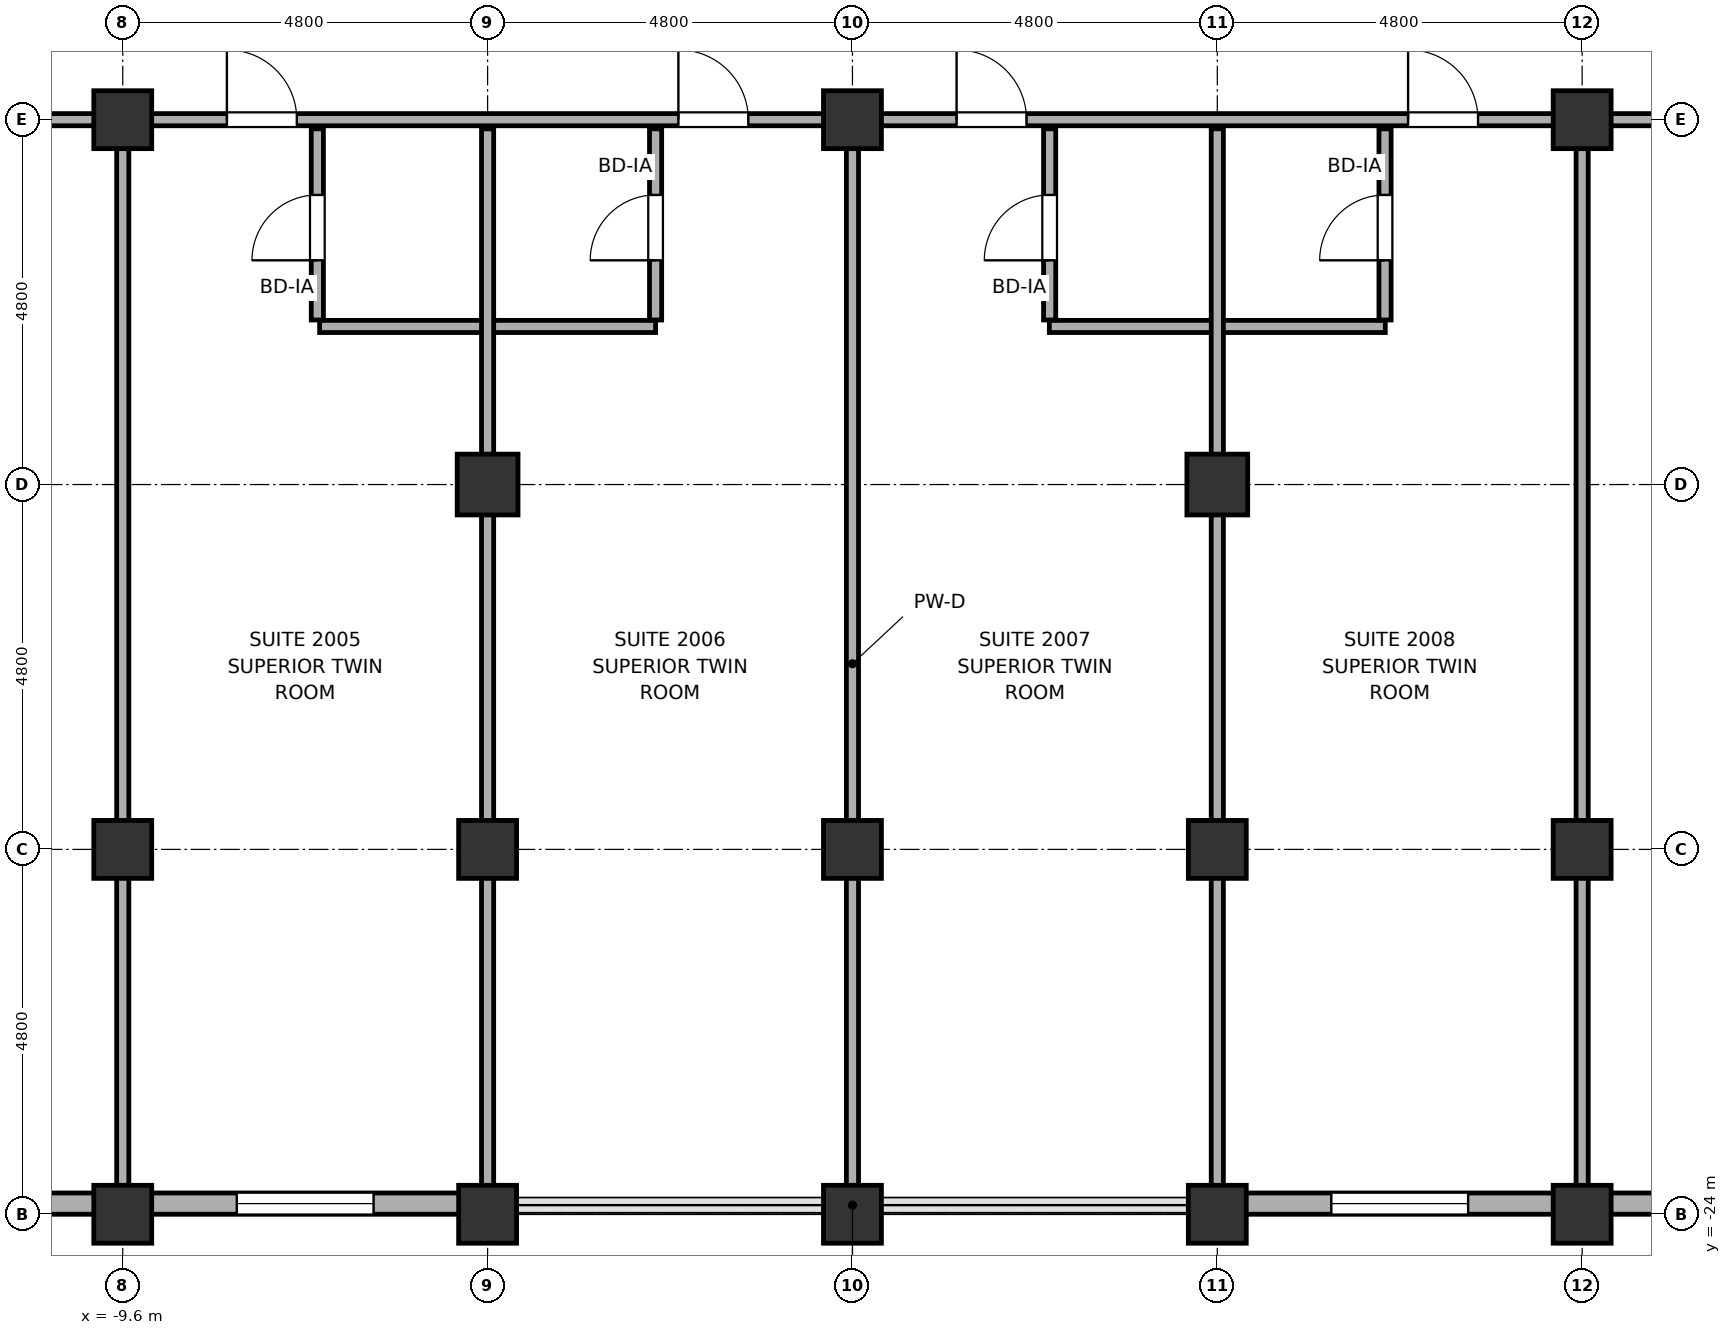
"""IFC4 building model, lengths in metres.
Left out: names, types, materials, properties, quantities, classifications, styles, units other than length and angle.
Written with IfcOpenShell. Run it as: python <this file> out.ifc"""

import sys

from ifc_helpers import new_model, si_unit, direction, frame, frame_2d, origin, origin_2d, place, context, subcontext, project, spatial, rectangle, hollow_rectangle, hollow_circle, extrude, element, fill, save


model = new_model("IFC4")
c1 = context("Model", 3, precision=1e-05, world=origin(), true_north=direction((0.0, 1.0)))
c2 = subcontext(c1, "Body", "Model", "MODEL_VIEW")
j1 = project(units=[si_unit("LENGTHUNIT", "METRE"), si_unit("PLANEANGLEUNIT", "RADIAN")], contexts=[c1])
p1 = place(None, origin())
s1 = spatial("IfcSite", under=j1, at=p1, CompositionType="ELEMENT")
p2 = place(p1, origin())
s2 = spatial("IfcBuilding", under=s1, at=p2, CompositionType="ELEMENT")
p3 = place(p2, frame((0.0, 0.0, 85.5)))
s3 = spatial("IfcBuildingStorey", under=s2, at=p3, CompositionType="ELEMENT", Elevation=85.5)
for number, where, z_axis, x_axis in (
    (1, (-9.6, -24.0, 0.0), (0.0, 0.0, 1.0), (1.0, 0.0, 0.0)),
    (2, (-9.6, -19.2, 0.0), (0.0, 0.0, 1.0), (1.0, 0.0, 0.0)),
    (3, (-9.6, -9.6, 0.0), (0.0, 0.0, 1.0), (1.0, 0.0, 0.0)),
    (4, (-4.8, -24.0, 0.0), (0.0, 0.0, 1.0), (1.0, 0.0, 0.0)),
    (5, (-4.8, -19.2, 0.0), (0.0, 0.0, 1.0), (1.0, 0.0, 0.0)),
):
    element("IfcColumn", number, at=place(p3, frame(where, z_axis=z_axis, x_axis=x_axis)), inside=s3, PredefinedType="COLUMN", context=c2, shape_type="SweptSolid", body=[
        extrude(hollow_circle(Radius=0.381, WallThickness=0.032, at=origin_2d()), origin(), (0.0, 0.0, 1.0), 3.7),
    ])
p4 = place(p3, frame((-4.8, -14.4, 0.0), z_axis=(0.0, 0.0, 1.0), x_axis=(1.0, 0.0, 0.0)))
e6 = element("IfcColumn", 6, at=p4, inside=s3, PredefinedType="COLUMN", context=c2, shape_type="SweptSolid", body=[
    extrude(hollow_rectangle(XDim=0.8, YDim=0.8, WallThickness=0.036, at=origin_2d()), origin(), (0.0, 0.0, 1.0), 3.7),
])
for number, where, z_axis, x_axis in (
    (7, (0.0, -24.0, 0.0), (0.0, 0.0, 1.0), (1.0, 0.0, 0.0)),
    (8, (0.0, -19.2, 0.0), (0.0, 0.0, 1.0), (1.0, 0.0, 0.0)),
    (9, (0.0, -9.6, 0.0), (0.0, 0.0, 1.0), (1.0, 0.0, 0.0)),
    (10, (4.8, -24.0, 0.0), (0.0, 0.0, 1.0), (1.0, 0.0, 0.0)),
    (11, (4.8, -19.2, 0.0), (0.0, 0.0, 1.0), (1.0, 0.0, 0.0)),
):
    element("IfcColumn", number, at=place(p3, frame(where, z_axis=z_axis, x_axis=x_axis)), inside=s3, PredefinedType="COLUMN", context=c2, shape_type="SweptSolid", body=[
        extrude(hollow_circle(Radius=0.381, WallThickness=0.032, at=origin_2d()), origin(), (0.0, 0.0, 1.0), 3.7),
    ])
p5 = place(p3, frame((4.8, -14.4, 0.0), z_axis=(0.0, 0.0, 1.0), x_axis=(1.0, 0.0, 0.0)))
e12 = element("IfcColumn", 12, at=p5, inside=s3, PredefinedType="COLUMN", context=c2, shape_type="SweptSolid", body=[
    extrude(hollow_rectangle(XDim=0.8, YDim=0.8, WallThickness=0.036, at=origin_2d()), origin(), (0.0, 0.0, 1.0), 3.7),
])
for number, where, z_axis, x_axis in (
    (13, (9.6, -24.0, 0.0), (0.0, 0.0, 1.0), (1.0, 0.0, 0.0)),
    (14, (9.6, -19.2, 0.0), (0.0, 0.0, 1.0), (1.0, 0.0, 0.0)),
    (15, (9.6, -9.6, 0.0), (0.0, 0.0, 1.0), (1.0, 0.0, 0.0)),
):
    element("IfcColumn", number, at=place(p3, frame(where, z_axis=z_axis, x_axis=x_axis)), inside=s3, PredefinedType="COLUMN", context=c2, shape_type="SweptSolid", body=[
        extrude(hollow_circle(Radius=0.381, WallThickness=0.032, at=origin_2d()), origin(), (0.0, 0.0, 1.0), 3.7),
    ])
p6 = place(p3, frame((-25.2, -23.86, 0.0), z_axis=(0.0, 0.0, 1.0), x_axis=(1.0, 0.0, 0.0)))
e16 = element("IfcWall", 16, at=p6, inside=s3, PredefinedType="SOLIDWALL", context=c2, shape_type="SweptSolid", body=[
    extrude(rectangle(XDim=20.45, YDim=0.28, at=frame_2d((10.225, 0.0))), origin(), (0.0, 0.0, 1.0), 2.05),
])
p7 = place(p6, frame((7.5, 0.0, 0.75)))
e17 = element("IfcOpeningElement", 17, at=p7, cuts=e16, PredefinedType="OPENING", context=c2, shape_type="SweptSolid", body=[
    extrude(rectangle(XDim=1.8, YDim=1.15, at=frame_2d((0.9, 0.575))), frame((0.0, 0.155, 0.0), z_axis=(0.0, -1.0, 0.0), x_axis=(1.0, 0.0, 0.0)), (0.0, 0.0, 1.0), 0.31),
])
p8 = place(p6, frame((12.3, 0.0, 0.75)))
e18 = element("IfcOpeningElement", 18, at=p8, cuts=e16, PredefinedType="OPENING", context=c2, shape_type="SweptSolid", body=[
    extrude(rectangle(XDim=1.8, YDim=1.15, at=frame_2d((0.9, 0.575))), frame((0.0, 0.155, 0.0), z_axis=(0.0, -1.0, 0.0), x_axis=(1.0, 0.0, 0.0)), (0.0, 0.0, 1.0), 0.31),
])
p9 = place(p6, frame((17.1, 0.0, 0.75)))
e19 = element("IfcOpeningElement", 19, at=p9, cuts=e16, PredefinedType="OPENING", context=c2, shape_type="SweptSolid", body=[
    extrude(rectangle(XDim=1.8, YDim=1.15, at=frame_2d((0.9, 0.575))), frame((0.0, 0.155, 0.0), z_axis=(0.0, -1.0, 0.0), x_axis=(1.0, 0.0, 0.0)), (0.0, 0.0, 1.0), 0.31),
])
p10 = place(p3, frame((4.75, -23.86, 0.0), z_axis=(0.0, 0.0, 1.0), x_axis=(1.0, 0.0, 0.0)))
e20 = element("IfcWall", 20, at=p10, inside=s3, PredefinedType="SOLIDWALL", context=c2, shape_type="SweptSolid", body=[
    extrude(rectangle(XDim=25.25, YDim=0.28, at=frame_2d((12.625, 0.0))), origin(), (0.0, 0.0, 1.0), 2.05),
])
p11 = place(p10, frame((1.55, 0.0, 0.75)))
e21 = element("IfcOpeningElement", 21, at=p11, cuts=e20, PredefinedType="OPENING", context=c2, shape_type="SweptSolid", body=[
    extrude(rectangle(XDim=1.8, YDim=1.15, at=frame_2d((0.9, 0.575))), frame((0.0, 0.155, 0.0), z_axis=(0.0, -1.0, 0.0), x_axis=(1.0, 0.0, 0.0)), (0.0, 0.0, 1.0), 0.31),
])
p12 = place(p10, frame((6.35, 0.0, 0.75)))
e22 = element("IfcOpeningElement", 22, at=p12, cuts=e20, PredefinedType="OPENING", context=c2, shape_type="SweptSolid", body=[
    extrude(rectangle(XDim=1.8, YDim=1.15, at=frame_2d((0.9, 0.575))), frame((0.0, 0.155, 0.0), z_axis=(0.0, -1.0, 0.0), x_axis=(1.0, 0.0, 0.0)), (0.0, 0.0, 1.0), 0.31),
])
p13 = place(p10, frame((11.15, 0.0, 0.75)))
e23 = element("IfcOpeningElement", 23, at=p13, cuts=e20, PredefinedType="OPENING", context=c2, shape_type="SweptSolid", body=[
    extrude(rectangle(XDim=1.8, YDim=1.15, at=frame_2d((0.9, 0.575))), frame((0.0, 0.155, 0.0), z_axis=(0.0, -1.0, 0.0), x_axis=(1.0, 0.0, 0.0)), (0.0, 0.0, 1.0), 0.31),
])
p14 = place(p10, frame((15.95, 0.0, 0.75)))
e24 = element("IfcOpeningElement", 24, at=p14, cuts=e20, PredefinedType="OPENING", context=c2, shape_type="SweptSolid", body=[
    extrude(rectangle(XDim=1.8, YDim=1.15, at=frame_2d((0.9, 0.575))), frame((0.0, 0.155, 0.0), z_axis=(0.0, -1.0, 0.0), x_axis=(1.0, 0.0, 0.0)), (0.0, 0.0, 1.0), 0.31),
])
for number, where, z_axis, x_axis in (
    (25, (-7.01, -12.32, 0.0), (0.0, 0.0, 1.0), (1.0, 0.0, 0.0)),
    (26, (2.59, -12.32, 0.0), (0.0, 0.0, 1.0), (1.0, 0.0, 0.0)),
):
    element("IfcWall", number, at=place(p3, frame(where, z_axis=z_axis, x_axis=x_axis)), inside=s3, PredefinedType="PARTITIONING", context=c2, shape_type="SweptSolid", body=[
        extrude(rectangle(XDim=4.42, YDim=0.16, at=frame_2d((2.21, 0.0))), origin(), (0.0, 0.0, 1.0), 2.75),
    ])
p15 = place(p3, frame((-28.51, -9.6, 0.0), z_axis=(0.0, 0.0, 1.0), x_axis=(1.0, 0.0, 0.0)))
e27 = element("IfcWall", 27, at=p15, inside=s3, PredefinedType="PARTITIONING", context=c2, shape_type="SweptSolid", body=[
    extrude(rectangle(XDim=61.82, YDim=0.16, at=frame_2d((30.91, 0.0))), origin(), (0.0, 0.0, 1.0), 2.05),
])
p16 = place(p15, frame((6.679, 0.0, 0.0)))
e28 = element("IfcOpeningElement", 28, at=p16, cuts=e27, PredefinedType="OPENING", context=c2, shape_type="SweptSolid", body=[
    extrude(rectangle(XDim=0.9, YDim=2.02, at=frame_2d((0.45, 1.01))), frame((0.0, 0.095, 0.0), z_axis=(0.0, -1.0, 0.0), x_axis=(1.0, 0.0, 0.0)), (0.0, 0.0, 1.0), 0.19),
])
p17 = place(p15, frame((54.5, 0.0, 0.0)))
e29 = element("IfcOpeningElement", 29, at=p17, cuts=e27, PredefinedType="OPENING", context=c2, shape_type="SweptSolid", body=[
    extrude(rectangle(XDim=0.9, YDim=2.02, at=frame_2d((0.45, 1.01))), frame((0.0, 0.095, 0.0), z_axis=(0.0, -1.0, 0.0), x_axis=(1.0, 0.0, 0.0)), (0.0, 0.0, 1.0), 0.19),
])
p18 = place(p15, frame((10.68, 0.0, 0.0)))
e30 = element("IfcOpeningElement", 30, at=p18, cuts=e27, PredefinedType="OPENING", context=c2, shape_type="SweptSolid", body=[
    extrude(rectangle(XDim=0.92, YDim=2.02, at=frame_2d((0.46, 1.01))), frame((0.0, 0.095, 0.0), z_axis=(0.0, -1.0, 0.0), x_axis=(1.0, 0.0, 0.0)), (0.0, 0.0, 1.0), 0.19),
])
p19 = place(p15, frame((16.62, 0.0, 0.0)))
e31 = element("IfcOpeningElement", 31, at=p19, cuts=e27, PredefinedType="OPENING", context=c2, shape_type="SweptSolid", body=[
    extrude(rectangle(XDim=0.92, YDim=2.02, at=frame_2d((0.46, 1.01))), frame((0.0, 0.095, 0.0), z_axis=(0.0, -1.0, 0.0), x_axis=(1.0, 0.0, 0.0)), (0.0, 0.0, 1.0), 0.19),
])
p20 = place(p15, frame((20.28, 0.0, 0.0)))
e32 = element("IfcOpeningElement", 32, at=p20, cuts=e27, PredefinedType="OPENING", context=c2, shape_type="SweptSolid", body=[
    extrude(rectangle(XDim=0.92, YDim=2.02, at=frame_2d((0.46, 1.01))), frame((0.0, 0.095, 0.0), z_axis=(0.0, -1.0, 0.0), x_axis=(1.0, 0.0, 0.0)), (0.0, 0.0, 1.0), 0.19),
])
p21 = place(p15, frame((26.22, 0.0, 0.0)))
e33 = element("IfcOpeningElement", 33, at=p21, cuts=e27, PredefinedType="OPENING", context=c2, shape_type="SweptSolid", body=[
    extrude(rectangle(XDim=0.92, YDim=2.02, at=frame_2d((0.46, 1.01))), frame((0.0, 0.095, 0.0), z_axis=(0.0, -1.0, 0.0), x_axis=(1.0, 0.0, 0.0)), (0.0, 0.0, 1.0), 0.19),
])
p22 = place(p15, frame((29.88, 0.0, 0.0)))
e34 = element("IfcOpeningElement", 34, at=p22, cuts=e27, PredefinedType="OPENING", context=c2, shape_type="SweptSolid", body=[
    extrude(rectangle(XDim=0.92, YDim=2.02, at=frame_2d((0.46, 1.01))), frame((0.0, 0.095, 0.0), z_axis=(0.0, -1.0, 0.0), x_axis=(1.0, 0.0, 0.0)), (0.0, 0.0, 1.0), 0.19),
])
p23 = place(p15, frame((35.82, 0.0, 0.0)))
e35 = element("IfcOpeningElement", 35, at=p23, cuts=e27, PredefinedType="OPENING", context=c2, shape_type="SweptSolid", body=[
    extrude(rectangle(XDim=0.92, YDim=2.02, at=frame_2d((0.46, 1.01))), frame((0.0, 0.095, 0.0), z_axis=(0.0, -1.0, 0.0), x_axis=(1.0, 0.0, 0.0)), (0.0, 0.0, 1.0), 0.19),
])
p24 = place(p15, frame((40.06, 0.0, 0.0)))
e36 = element("IfcOpeningElement", 36, at=p24, cuts=e27, PredefinedType="OPENING", context=c2, shape_type="SweptSolid", body=[
    extrude(rectangle(XDim=0.9, YDim=2.02, at=frame_2d((0.45, 1.01))), frame((0.0, 0.095, 0.0), z_axis=(0.0, -1.0, 0.0), x_axis=(1.0, 0.0, 0.0)), (0.0, 0.0, 1.0), 0.19),
])
p25 = place(p15, frame((44.86, 0.0, 0.0)))
e37 = element("IfcOpeningElement", 37, at=p25, cuts=e27, PredefinedType="OPENING", context=c2, shape_type="SweptSolid", body=[
    extrude(rectangle(XDim=0.9, YDim=2.02, at=frame_2d((0.45, 1.01))), frame((0.0, 0.095, 0.0), z_axis=(0.0, -1.0, 0.0), x_axis=(1.0, 0.0, 0.0)), (0.0, 0.0, 1.0), 0.19),
])
p26 = place(p15, frame((49.08, 0.0, 0.0)))
e38 = element("IfcOpeningElement", 38, at=p26, cuts=e27, PredefinedType="OPENING", context=c2, shape_type="SweptSolid", body=[
    extrude(rectangle(XDim=0.92, YDim=2.02, at=frame_2d((0.46, 1.01))), frame((0.0, 0.095, 0.0), z_axis=(0.0, -1.0, 0.0), x_axis=(1.0, 0.0, 0.0)), (0.0, 0.0, 1.0), 0.19),
])
p27 = place(p3, frame((-9.6, -23.71, 0.0), z_axis=(0.0, 0.0, 1.0), x_axis=(0.0, 1.0, 0.0)))
e39 = element("IfcWall", 39, at=p27, inside=s3, PredefinedType="PARTITIONING", context=c2, shape_type="SweptSolid", body=[
    extrude(rectangle(XDim=13.99, YDim=0.16, at=frame_2d((6.995, 0.0))), origin(), (0.0, 0.0, 1.0), 2.05),
])
p28 = place(p3, frame((-7.04, -12.235, 0.0), z_axis=(0.0, 0.0, 1.0), x_axis=(0.0, 1.0, 0.0)))
e40 = element("IfcWall", 40, at=p28, inside=s3, PredefinedType="PARTITIONING", context=c2, shape_type="SweptSolid", body=[
    extrude(rectangle(XDim=2.515, YDim=0.16, at=frame_2d((1.258, 0.0))), origin(), (0.0, 0.0, 1.0), 2.05),
])
p29 = place(p28, frame((0.785, 0.0, 0.0)))
e41 = element("IfcOpeningElement", 41, at=p29, cuts=e40, PredefinedType="OPENING", context=c2, shape_type="SweptSolid", body=[
    extrude(rectangle(XDim=0.86, YDim=2.02, at=frame_2d((0.43, 1.01))), frame((0.0, 0.095, 0.0), z_axis=(0.0, -1.0, 0.0), x_axis=(1.0, 0.0, 0.0)), (0.0, 0.0, 1.0), 0.19),
])
p30 = place(p3, frame((-4.8, -23.71, 0.0), z_axis=(0.0, 0.0, 1.0), x_axis=(0.0, 1.0, 0.0)))
e42 = element("IfcWall", 42, at=p30, inside=s3, PredefinedType="PARTITIONING", context=c2, shape_type="SweptSolid", body=[
    extrude(rectangle(XDim=13.99, YDim=0.16, at=frame_2d((6.995, 0.0))), origin(), (0.0, 0.0, 1.0), 2.05),
])
p31 = place(p3, frame((-2.59, -12.235, 0.0), z_axis=(0.0, 0.0, 1.0), x_axis=(0.0, 1.0, 0.0)))
e43 = element("IfcWall", 43, at=p31, inside=s3, PredefinedType="PARTITIONING", context=c2, shape_type="SweptSolid", body=[
    extrude(rectangle(XDim=2.515, YDim=0.16, at=frame_2d((1.258, 0.0))), origin(), (0.0, 0.0, 1.0), 2.05),
])
p32 = place(p31, frame((0.785, 0.0, 0.0)))
e44 = element("IfcOpeningElement", 44, at=p32, cuts=e43, PredefinedType="OPENING", context=c2, shape_type="SweptSolid", body=[
    extrude(rectangle(XDim=0.86, YDim=2.02, at=frame_2d((0.43, 1.01))), frame((0.0, 0.095, 0.0), z_axis=(0.0, -1.0, 0.0), x_axis=(1.0, 0.0, 0.0)), (0.0, 0.0, 1.0), 0.19),
])
p33 = place(p3, frame((0.0, -23.795, 0.0), z_axis=(0.0, 0.0, 1.0), x_axis=(0.0, 1.0, 0.0)))
e45 = element("IfcWall", 45, at=p33, inside=s3, PredefinedType="PARTITIONING", context=c2, shape_type="SweptSolid", body=[
    extrude(rectangle(XDim=14.075, YDim=0.16, at=frame_2d((7.038, 0.0))), origin(), (0.0, 0.0, 1.0), 2.05),
])
p34 = place(p3, frame((2.594, -12.235, 0.0), z_axis=(0.0, 0.0, 1.0), x_axis=(0.0, 1.0, 0.0)))
e46 = element("IfcWall", 46, at=p34, inside=s3, PredefinedType="PARTITIONING", context=c2, shape_type="SweptSolid", body=[
    extrude(rectangle(XDim=2.515, YDim=0.16, at=frame_2d((1.258, 0.0))), origin(), (0.0, 0.0, 1.0), 2.05),
])
p35 = place(p34, frame((0.785, 0.0, 0.0)))
e47 = element("IfcOpeningElement", 47, at=p35, cuts=e46, PredefinedType="OPENING", context=c2, shape_type="SweptSolid", body=[
    extrude(rectangle(XDim=0.86, YDim=2.02, at=frame_2d((0.43, 1.01))), frame((0.0, 0.095, 0.0), z_axis=(0.0, -1.0, 0.0), x_axis=(1.0, 0.0, 0.0)), (0.0, 0.0, 1.0), 0.19),
])
p36 = place(p3, frame((4.8, -23.71, 0.0), z_axis=(0.0, 0.0, 1.0), x_axis=(0.0, 1.0, 0.0)))
e48 = element("IfcWall", 48, at=p36, inside=s3, PredefinedType="PARTITIONING", context=c2, shape_type="SweptSolid", body=[
    extrude(rectangle(XDim=13.99, YDim=0.16, at=frame_2d((6.995, 0.0))), origin(), (0.0, 0.0, 1.0), 2.05),
])
p37 = place(p3, frame((7.007, -12.235, 0.0), z_axis=(0.0, 0.0, 1.0), x_axis=(0.0, 1.0, 0.0)))
e49 = element("IfcWall", 49, at=p37, inside=s3, PredefinedType="PARTITIONING", context=c2, shape_type="SweptSolid", body=[
    extrude(rectangle(XDim=2.515, YDim=0.16, at=frame_2d((1.258, 0.0))), origin(), (0.0, 0.0, 1.0), 2.05),
])
p38 = place(p37, frame((0.785, 0.0, 0.0)))
e50 = element("IfcOpeningElement", 50, at=p38, cuts=e49, PredefinedType="OPENING", context=c2, shape_type="SweptSolid", body=[
    extrude(rectangle(XDim=0.86, YDim=2.02, at=frame_2d((0.43, 1.01))), frame((0.0, 0.095, 0.0), z_axis=(0.0, -1.0, 0.0), x_axis=(1.0, 0.0, 0.0)), (0.0, 0.0, 1.0), 0.19),
])
p39 = place(p3, frame((9.6, -23.71, 0.0), z_axis=(0.0, 0.0, 1.0), x_axis=(0.0, 1.0, 0.0)))
e51 = element("IfcWall", 51, at=p39, inside=s3, PredefinedType="PARTITIONING", context=c2, shape_type="SweptSolid", body=[
    extrude(rectangle(XDim=13.99, YDim=0.16, at=frame_2d((6.995, 0.0))), origin(), (0.0, 0.0, 1.0), 2.05),
])
p40 = place(p9, origin())
e52 = element("IfcWindow", 52, at=p40, inside=s3, PartitioningType="SINGLE_PANEL", PredefinedType="WINDOW", context=c2, shape_type="SweptSolid", body=[
    extrude(rectangle(XDim=1.8, YDim=1.15, at=frame_2d((0.9, 0.575))), frame((0.0, 0.03, 0.0), z_axis=(0.0, -1.0, 0.0), x_axis=(1.0, 0.0, 0.0)), (0.0, 0.0, 1.0), 0.06),
])
fill(e19, e52)
p41 = place(p11, origin())
e53 = element("IfcWindow", 53, at=p41, inside=s3, PartitioningType="SINGLE_PANEL", PredefinedType="WINDOW", context=c2, shape_type="SweptSolid", body=[
    extrude(rectangle(XDim=1.8, YDim=1.15, at=frame_2d((0.9, 0.575))), frame((0.0, 0.03, 0.0), z_axis=(0.0, -1.0, 0.0), x_axis=(1.0, 0.0, 0.0)), (0.0, 0.0, 1.0), 0.06),
])
fill(e21, e53)
p42 = place(p20, origin())
e54 = element("IfcDoor", 54, at=p42, inside=s3, OperationType="SINGLE_SWING_LEFT", PredefinedType="DOOR", context=c2, shape_type="SweptSolid", body=[
    extrude(rectangle(XDim=0.92, YDim=2.02, at=frame_2d((0.46, 1.01))), frame((0.0, 0.025, 0.0), z_axis=(0.0, -1.0, 0.0), x_axis=(1.0, 0.0, 0.0)), (0.0, 0.0, 1.0), 0.05),
])
fill(e32, e54)
p43 = place(p29, origin())
e55 = element("IfcDoor", 55, at=p43, inside=s3, OperationType="SINGLE_SWING_RIGHT", PredefinedType="DOOR", context=c2, shape_type="SweptSolid", body=[
    extrude(rectangle(XDim=0.86, YDim=2.02, at=frame_2d((0.43, 1.01))), frame((0.0, 0.025, 0.0), z_axis=(0.0, -1.0, 0.0), x_axis=(1.0, 0.0, 0.0)), (0.0, 0.0, 1.0), 0.05),
])
fill(e41, e55)
p44 = place(p21, origin())
e56 = element("IfcDoor", 56, at=p44, inside=s3, OperationType="SINGLE_SWING_LEFT", PredefinedType="DOOR", context=c2, shape_type="SweptSolid", body=[
    extrude(rectangle(XDim=0.92, YDim=2.02, at=frame_2d((0.46, 1.01))), frame((0.0, 0.025, 0.0), z_axis=(0.0, -1.0, 0.0), x_axis=(1.0, 0.0, 0.0)), (0.0, 0.0, 1.0), 0.05),
])
fill(e33, e56)
p45 = place(p32, origin())
e57 = element("IfcDoor", 57, at=p45, inside=s3, OperationType="SINGLE_SWING_LEFT", PredefinedType="DOOR", context=c2, shape_type="SweptSolid", body=[
    extrude(rectangle(XDim=0.86, YDim=2.02, at=frame_2d((0.43, 1.01))), frame((0.0, 0.025, 0.0), z_axis=(0.0, -1.0, 0.0), x_axis=(1.0, 0.0, 0.0)), (0.0, 0.0, 1.0), 0.05),
])
fill(e44, e57)
p46 = place(p22, origin())
e58 = element("IfcDoor", 58, at=p46, inside=s3, OperationType="SINGLE_SWING_LEFT", PredefinedType="DOOR", context=c2, shape_type="SweptSolid", body=[
    extrude(rectangle(XDim=0.92, YDim=2.02, at=frame_2d((0.46, 1.01))), frame((0.0, 0.025, 0.0), z_axis=(0.0, -1.0, 0.0), x_axis=(1.0, 0.0, 0.0)), (0.0, 0.0, 1.0), 0.05),
])
fill(e34, e58)
p47 = place(p35, origin())
e59 = element("IfcDoor", 59, at=p47, inside=s3, OperationType="SINGLE_SWING_LEFT", PredefinedType="DOOR", context=c2, shape_type="SweptSolid", body=[
    extrude(rectangle(XDim=0.86, YDim=2.02, at=frame_2d((0.43, 1.01))), frame((0.0, 0.025, 0.0), z_axis=(0.0, -1.0, 0.0), x_axis=(1.0, 0.0, 0.0)), (0.0, 0.0, 1.0), 0.05),
])
fill(e47, e59)
p48 = place(p23, origin())
e60 = element("IfcDoor", 60, at=p48, inside=s3, OperationType="SINGLE_SWING_RIGHT", PredefinedType="DOOR", context=c2, shape_type="SweptSolid", body=[
    extrude(rectangle(XDim=0.92, YDim=2.02, at=frame_2d((0.46, 1.01))), frame((0.0, 0.025, 0.0), z_axis=(0.0, -1.0, 0.0), x_axis=(1.0, 0.0, 0.0)), (0.0, 0.0, 1.0), 0.05),
])
fill(e35, e60)
p49 = place(p38, origin())
e61 = element("IfcDoor", 61, at=p49, inside=s3, OperationType="SINGLE_SWING_RIGHT", PredefinedType="DOOR", context=c2, shape_type="SweptSolid", body=[
    extrude(rectangle(XDim=0.86, YDim=2.02, at=frame_2d((0.43, 1.01))), frame((0.0, 0.025, 0.0), z_axis=(0.0, -1.0, 0.0), x_axis=(1.0, 0.0, 0.0)), (0.0, 0.0, 1.0), 0.05),
])
fill(e50, e61)
save(model, sys.argv[1])
